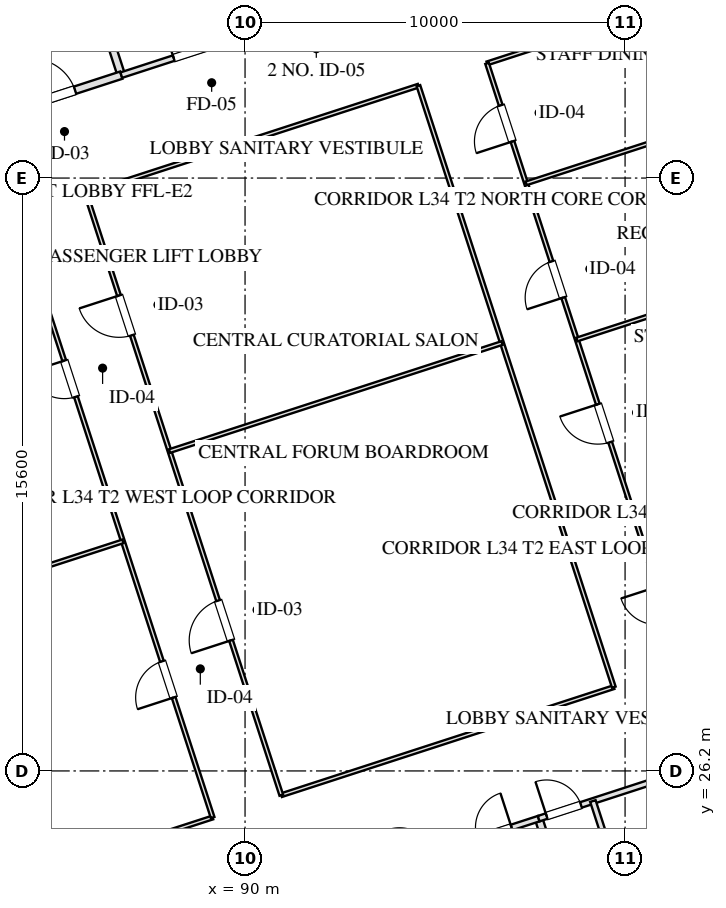
"""IFC4 building model, lengths in metres.
Left out: names, types, materials, properties, quantities, classifications, styles, units other than length and angle.
Written with IfcOpenShell. Run it as: python <this file> out.ifc"""

import sys

from ifc_helpers import new_model, si_unit, direction, frame, frame_2d, origin, place, context, subcontext, project, spatial, rectangle, extrude, element, fill, save


model = new_model("IFC4")
c1 = context("Model", 3, precision=1e-05, world=origin(), true_north=direction((0.0, 1.0)))
c2 = subcontext(c1, "Body", "Model", "MODEL_VIEW")
j1 = project(units=[si_unit("LENGTHUNIT", "METRE"), si_unit("PLANEANGLEUNIT", "RADIAN")], contexts=[c1])
p1 = place(None, origin())
s1 = spatial("IfcSite", under=j1, at=p1, CompositionType="ELEMENT")
p2 = place(p1, origin())
s2 = spatial("IfcBuilding", under=s1, at=p2, CompositionType="ELEMENT")
p3 = place(p2, frame((0.0, 0.0, 131.1)))
s3 = spatial("IfcBuildingStorey", under=s2, at=p3, CompositionType="ELEMENT", Elevation=131.1)
p4 = place(p3, frame((99.284, 61.41, 0.0), z_axis=(0.0, 0.0, 1.0), x_axis=(0.309017542002, -0.95105633836, 0.0)))
e1 = element("IfcWall", 1, at=p4, inside=s3, PredefinedType="SOLIDWALL", context=c2, shape_type="SweptSolid", body=[
    extrude(rectangle(XDim=46.4, YDim=0.4, at=frame_2d((23.2, 0.0))), origin(), (0.0, 0.0, 1.0), 2.61),
])
p5 = place(p4, frame((25.25, 0.0, 0.0)))
e2 = element("IfcOpeningElement", 2, at=p5, cuts=e1, PredefinedType="OPENING", context=c2, shape_type="SweptSolid", body=[
    extrude(rectangle(XDim=1.1, YDim=2.15, at=frame_2d((0.55, 1.075))), frame((0.0, 0.21, 0.0), z_axis=(0.0, -1.0, 0.0), x_axis=(1.0, 0.0, 0.0)), (0.0, 0.0, 1.0), 0.42),
])
p6 = place(p3, frame((97.727, 24.944, 0.0), z_axis=(0.0, 0.0, 1.0), x_axis=(0.309016001439, -0.951056838919, 0.0)))
e3 = element("IfcWall", 3, at=p6, inside=s3, PredefinedType="PARTITIONING", context=c2, shape_type="SweptSolid", body=[
    extrude(rectangle(XDim=8.43, YDim=0.2, at=frame_2d((4.215, 0.0))), origin(), (0.0, 0.0, 1.0), 3.175),
])
p7 = place(p3, frame((93.542, 23.585, 0.0), z_axis=(0.0, 0.0, 1.0), x_axis=(0.951063829732, 0.308994485023, 0.0)))
e4 = element("IfcWall", 4, at=p7, inside=s3, PredefinedType="PARTITIONING", context=c2, shape_type="SweptSolid", body=[
    extrude(rectangle(XDim=4.4, YDim=0.15, at=frame_2d((2.2, 0.0))), origin(), (0.0, 0.0, 1.0), 3.175),
])
p8 = place(p7, frame((0.55, 0.0, 0.0)))
e5 = element("IfcOpeningElement", 5, at=p8, cuts=e4, PredefinedType="OPENING", context=c2, shape_type="SweptSolid", body=[
    extrude(rectangle(XDim=0.95, YDim=2.05, at=frame_2d((0.475, 1.025))), frame((0.0, 0.085, 0.0), z_axis=(0.0, -1.0, 0.0), x_axis=(1.0, 0.0, 0.0)), (0.0, 0.0, 1.0), 0.17),
])
p9 = place(p7, frame((2.7, 0.0, 0.0)))
e6 = element("IfcOpeningElement", 6, at=p9, cuts=e4, PredefinedType="OPENING", context=c2, shape_type="SweptSolid", body=[
    extrude(rectangle(XDim=0.95, YDim=2.05, at=frame_2d((0.475, 1.025))), frame((0.0, 0.085, 0.0), z_axis=(0.0, -1.0, 0.0), x_axis=(1.0, 0.0, 0.0)), (0.0, 0.0, 1.0), 0.17),
])
p10 = place(p3, frame((97.727, 24.944, 0.0), z_axis=(0.0, 0.0, 1.0), x_axis=(0.951036872128, 0.309077446369, 0.0)))
e7 = element("IfcWall", 7, at=p10, inside=s3, PredefinedType="PARTITIONING", context=c2, shape_type="SweptSolid", body=[
    extrude(rectangle(XDim=3.2, YDim=0.15, at=frame_2d((1.6, 0.0))), origin(), (0.0, 0.0, 1.0), 3.175),
])
p11 = place(p10, frame((0.22, 0.0, 0.0)))
e8 = element("IfcOpeningElement", 8, at=p11, cuts=e7, PredefinedType="OPENING", context=c2, shape_type="SweptSolid", body=[
    extrude(rectangle(XDim=0.95, YDim=2.05, at=frame_2d((0.475, 1.025))), frame((0.0, 0.085, 0.0), z_axis=(0.0, -1.0, 0.0), x_axis=(1.0, 0.0, 0.0)), (0.0, 0.0, 1.0), 0.17),
])
p12 = place(p3, frame((99.153, 25.408, 0.0), z_axis=(0.0, 0.0, 1.0), x_axis=(0.309016001439, -0.951056838919, 0.0)))
e9 = element("IfcWall", 9, at=p12, inside=s3, PredefinedType="PARTITIONING", context=c2, shape_type="SweptSolid", body=[
    extrude(rectangle(XDim=8.43, YDim=0.15, at=frame_2d((4.215, 0.0))), origin(), (0.0, 0.0, 1.0), 3.175),
])
p13 = place(p12, frame((2.55, 0.0, 0.0)))
e10 = element("IfcOpeningElement", 10, at=p13, cuts=e9, PredefinedType="OPENING", context=c2, shape_type="SweptSolid", body=[
    extrude(rectangle(XDim=0.95, YDim=2.05, at=frame_2d((0.475, 1.025))), frame((0.0, 0.085, 0.0), z_axis=(0.0, -1.0, 0.0), x_axis=(1.0, 0.0, 0.0)), (0.0, 0.0, 1.0), 0.17),
])
p14 = place(p12, frame((5.8, 0.0, 0.0)))
e11 = element("IfcOpeningElement", 11, at=p14, cuts=e9, PredefinedType="OPENING", context=c2, shape_type="SweptSolid", body=[
    extrude(rectangle(XDim=0.9, YDim=2.05, at=frame_2d((0.45, 1.025))), frame((0.0, 0.085, 0.0), z_axis=(0.0, -1.0, 0.0), x_axis=(1.0, 0.0, 0.0)), (0.0, 0.0, 1.0), 0.17),
])
p15 = place(p3, frame((86.743, 44.508, 0.0), z_axis=(0.0, 0.0, 1.0), x_axis=(-0.309016001439, 0.951056838919, 0.0)))
e12 = element("IfcWall", 12, at=p15, inside=s3, PredefinedType="PARTITIONING", context=c2, shape_type="SweptSolid", body=[
    extrude(rectangle(XDim=8.43, YDim=0.2, at=frame_2d((4.215, 0.0))), origin(), (0.0, 0.0, 1.0), 3.175),
])
p16 = place(p3, frame((83.101, 43.324, 0.0), z_axis=(0.0, 0.0, 1.0), x_axis=(0.951052804469, 0.309028417967, 0.0)))
e13 = element("IfcWall", 13, at=p16, inside=s3, PredefinedType="PARTITIONING", context=c2, shape_type="SweptSolid", body=[
    extrude(rectangle(XDim=3.83, YDim=0.2, at=frame_2d((1.915, 0.0))), origin(), (0.0, 0.0, 1.0), 3.175),
])
p17 = place(p16, frame((1.35, 0.0, 0.0)))
e14 = element("IfcOpeningElement", 14, at=p17, cuts=e13, PredefinedType="OPENING", context=c2, shape_type="SweptSolid", body=[
    extrude(rectangle(XDim=1.2, YDim=2.05, at=frame_2d((0.6, 1.025))), frame((0.0, 0.11, 0.0), z_axis=(0.0, -1.0, 0.0), x_axis=(1.0, 0.0, 0.0)), (0.0, 0.0, 1.0), 0.22),
])
p18 = place(p3, frame((86.743, 44.508, 0.0), z_axis=(0.0, 0.0, 1.0), x_axis=(0.951063829732, 0.308994485023, 0.0)))
e15 = element("IfcWall", 15, at=p18, inside=s3, PredefinedType="PARTITIONING", context=c2, shape_type="SweptSolid", body=[
    extrude(rectangle(XDim=4.4, YDim=0.15, at=frame_2d((2.2, 0.0))), origin(), (0.0, 0.0, 1.0), 3.175),
])
p19 = place(p18, frame((1.45, 0.0, 0.0)))
e16 = element("IfcOpeningElement", 16, at=p19, cuts=e15, PredefinedType="OPENING", context=c2, shape_type="SweptSolid", body=[
    extrude(rectangle(XDim=1.5, YDim=2.05, at=frame_2d((0.75, 1.025))), frame((0.0, 0.085, 0.0), z_axis=(0.0, -1.0, 0.0), x_axis=(1.0, 0.0, 0.0)), (0.0, 0.0, 1.0), 0.17),
])
p20 = place(p3, frame((76.308, 20.803, 0.0), z_axis=(0.0, 0.0, 1.0), x_axis=(0.951054001411, 0.309024734286, 0.0)))
e17 = element("IfcWall", 17, at=p20, inside=s3, PredefinedType="MOVABLE", context=c2, shape_type="SweptSolid", body=[
    extrude(rectangle(XDim=13.5, YDim=0.1, at=frame_2d((6.75, 0.0))), origin(), (0.0, 0.0, 1.0), 3.175),
])
p21 = place(p3, frame((90.954, 25.562, 0.0), z_axis=(0.0, 0.0, 1.0), x_axis=(0.951052398814, 0.309029666393, 0.0)))
e18 = element("IfcWall", 18, at=p21, inside=s3, PredefinedType="MOVABLE", context=c2, shape_type="SweptSolid", body=[
    extrude(rectangle(XDim=9.2, YDim=0.1, at=frame_2d((4.6, 0.0))), origin(), (0.0, 0.0, 1.0), 3.175),
])
p22 = place(p3, frame((85.812, 41.387, 0.0), z_axis=(0.0, 0.0, 1.0), x_axis=(0.951054933035, 0.309021867106, 0.0)))
e19 = element("IfcWall", 19, at=p22, inside=s3, PredefinedType="MOVABLE", context=c2, shape_type="SweptSolid", body=[
    extrude(rectangle(XDim=9.2, YDim=0.1, at=frame_2d((4.6, 0.0))), origin(), (0.0, 0.0, 1.0), 3.175),
])
p23 = place(p3, frame((96.369, 44.818, 0.0), z_axis=(0.0, 0.0, 1.0), x_axis=(0.9510592298, 0.30900864294, 0.0)))
e20 = element("IfcWall", 20, at=p23, inside=s3, PredefinedType="MOVABLE", context=c2, shape_type="SweptSolid", body=[
    extrude(rectangle(XDim=7.7, YDim=0.1, at=frame_2d((3.85, 0.0))), origin(), (0.0, 0.0, 1.0), 3.175),
])
p24 = place(p3, frame((89.147, 24.975, 0.0), z_axis=(0.0, 0.0, 1.0), x_axis=(-0.309022042254, 0.951054876125, 0.0)))
e21 = element("IfcWall", 21, at=p24, inside=s3, PredefinedType="MOVABLE", context=c2, shape_type="SweptSolid", body=[
    extrude(rectangle(XDim=16.64, YDim=0.1, at=frame_2d((8.32, 0.0))), origin(), (0.0, 0.0, 1.0), 3.175),
])
p25 = place(p24, frame((3.32, 0.0, 0.0)))
e22 = element("IfcOpeningElement", 22, at=p25, cuts=e21, PredefinedType="OPENING", context=c2, shape_type="SweptSolid", body=[
    extrude(rectangle(XDim=1.0, YDim=2.05, at=frame_2d((0.5, 1.025))), frame((0.0, 0.06, 0.0), z_axis=(0.0, -1.0, 0.0), x_axis=(1.0, 0.0, 0.0)), (0.0, 0.0, 1.0), 0.12),
])
p26 = place(p24, frame((11.64, 0.0, 0.0)))
e23 = element("IfcOpeningElement", 23, at=p26, cuts=e21, PredefinedType="OPENING", context=c2, shape_type="SweptSolid", body=[
    extrude(rectangle(XDim=1.0, YDim=2.05, at=frame_2d((0.5, 1.025))), frame((0.0, 0.06, 0.0), z_axis=(0.0, -1.0, 0.0), x_axis=(1.0, 0.0, 0.0)), (0.0, 0.0, 1.0), 0.12),
])
p27 = place(p3, frame((90.954, 25.562, 0.0), z_axis=(0.0, 0.0, 1.0), x_axis=(-0.30901773025, 0.951056277195, 0.0)))
e24 = element("IfcWall", 24, at=p27, inside=s3, PredefinedType="MOVABLE", context=c2, shape_type="SweptSolid", body=[
    extrude(rectangle(XDim=16.64, YDim=0.1, at=frame_2d((8.32, 0.0))), origin(), (0.0, 0.0, 1.0), 3.175),
])
p28 = place(p27, frame((4.284, 0.0, 0.0)))
e25 = element("IfcOpeningElement", 25, at=p28, cuts=e24, PredefinedType="OPENING", context=c2, shape_type="SweptSolid", body=[
    extrude(rectangle(XDim=1.1, YDim=2.05, at=frame_2d((0.55, 1.025))), frame((0.0, 0.06, 0.0), z_axis=(0.0, -1.0, 0.0), x_axis=(1.0, 0.0, 0.0)), (0.0, 0.0, 1.0), 0.12),
])
p29 = place(p27, frame((12.724, 0.0, 0.0)))
e26 = element("IfcOpeningElement", 26, at=p29, cuts=e24, PredefinedType="OPENING", context=c2, shape_type="SweptSolid", body=[
    extrude(rectangle(XDim=1.1, YDim=2.05, at=frame_2d((0.55, 1.025))), frame((0.0, 0.06, 0.0), z_axis=(0.0, -1.0, 0.0), x_axis=(1.0, 0.0, 0.0)), (0.0, 0.0, 1.0), 0.12),
])
p30 = place(p3, frame((99.704, 28.405, 0.0), z_axis=(0.0, 0.0, 1.0), x_axis=(-0.309004459387, 0.951060589068, 0.0)))
e27 = element("IfcWall", 27, at=p30, inside=s3, PredefinedType="MOVABLE", context=c2, shape_type="SweptSolid", body=[
    extrude(rectangle(XDim=16.64, YDim=0.1, at=frame_2d((8.32, 0.0))), origin(), (0.0, 0.0, 1.0), 3.175),
])
p31 = place(p3, frame((101.511, 28.992, 0.0), z_axis=(0.0, 0.0, 1.0), x_axis=(-0.30901773025, 0.951056277195, 0.0)))
e28 = element("IfcWall", 28, at=p31, inside=s3, PredefinedType="MOVABLE", context=c2, shape_type="SweptSolid", body=[
    extrude(rectangle(XDim=16.64, YDim=0.1, at=frame_2d((8.32, 0.0))), origin(), (0.0, 0.0, 1.0), 3.175),
])
p32 = place(p31, frame((1.16, 0.0, 0.0)))
e29 = element("IfcOpeningElement", 29, at=p32, cuts=e28, PredefinedType="OPENING", context=c2, shape_type="SweptSolid", body=[
    extrude(rectangle(XDim=1.0, YDim=2.05, at=frame_2d((0.5, 1.025))), frame((0.0, 0.06, 0.0), z_axis=(0.0, -1.0, 0.0), x_axis=(1.0, 0.0, 0.0)), (0.0, 0.0, 1.0), 0.12),
])
p33 = place(p31, frame((6.16, 0.0, 0.0)))
e30 = element("IfcOpeningElement", 30, at=p33, cuts=e28, PredefinedType="OPENING", context=c2, shape_type="SweptSolid", body=[
    extrude(rectangle(XDim=1.05, YDim=2.05, at=frame_2d((0.525, 1.025))), frame((0.0, 0.06, 0.0), z_axis=(0.0, -1.0, 0.0), x_axis=(1.0, 0.0, 0.0)), (0.0, 0.0, 1.0), 0.12),
])
p34 = place(p31, frame((10.16, 0.0, 0.0)))
e31 = element("IfcOpeningElement", 31, at=p34, cuts=e28, PredefinedType="OPENING", context=c2, shape_type="SweptSolid", body=[
    extrude(rectangle(XDim=1.0, YDim=2.05, at=frame_2d((0.5, 1.025))), frame((0.0, 0.06, 0.0), z_axis=(0.0, -1.0, 0.0), x_axis=(1.0, 0.0, 0.0)), (0.0, 0.0, 1.0), 0.12),
])
p35 = place(p31, frame((14.48, 0.0, 0.0)))
e32 = element("IfcOpeningElement", 32, at=p35, cuts=e28, PredefinedType="OPENING", context=c2, shape_type="SweptSolid", body=[
    extrude(rectangle(XDim=1.0, YDim=2.05, at=frame_2d((0.5, 1.025))), frame((0.0, 0.06, 0.0), z_axis=(0.0, -1.0, 0.0), x_axis=(1.0, 0.0, 0.0)), (0.0, 0.0, 1.0), 0.12),
])
p36 = place(p3, frame((88.012, 34.616, 0.0), z_axis=(0.0, 0.0, 1.0), x_axis=(0.951054933035, 0.309021867106, 0.0)))
e33 = element("IfcWall", 33, at=p36, inside=s3, PredefinedType="MOVABLE", context=c2, shape_type="SweptSolid", body=[
    extrude(rectangle(XDim=9.2, YDim=0.1, at=frame_2d((4.6, 0.0))), origin(), (0.0, 0.0, 1.0), 3.175),
])
p37 = place(p3, frame((73.947, 28.069, 0.0), z_axis=(0.0, 0.0, 1.0), x_axis=(0.951059316265, 0.309008376821, 0.0)))
e34 = element("IfcWall", 34, at=p37, inside=s3, PredefinedType="MOVABLE", context=c2, shape_type="SweptSolid", body=[
    extrude(rectangle(XDim=13.5, YDim=0.1, at=frame_2d((6.75, 0.0))), origin(), (0.0, 0.0, 1.0), 3.175),
])
p38 = place(p3, frame((100.176, 33.101, 0.0), z_axis=(0.0, 0.0, 1.0), x_axis=(0.951056202154, 0.3090179612, 0.0)))
e35 = element("IfcWall", 35, at=p38, inside=s3, PredefinedType="MOVABLE", context=c2, shape_type="SweptSolid", body=[
    extrude(rectangle(XDim=7.7, YDim=0.1, at=frame_2d((3.85, 0.0))), origin(), (0.0, 0.0, 1.0), 3.175),
])
for number, where, z_axis, x_axis in (
    (36, (98.73, 37.552, 0.0), (0.0, 0.0, 1.0), (0.951, 0.309, 0.0)),
    (37, (97.395, 41.66, 0.0), (0.0, 0.0, 1.0), (0.951, 0.309, 0.0)),
):
    element("IfcWall", number, at=place(p3, frame(where, z_axis=z_axis, x_axis=x_axis)), inside=s3, PredefinedType="MOVABLE", context=c2, shape_type="SweptSolid", body=[
        extrude(rectangle(XDim=7.7, YDim=0.1, at=frame_2d((3.85, 0.0))), origin(), (0.0, 0.0, 1.0), 3.175),
    ])
p39 = place(p9, origin())
e38 = element("IfcDoor", 38, at=p39, inside=s3, OperationType="SINGLE_SWING_RIGHT", PredefinedType="DOOR", context=c2, shape_type="SweptSolid", body=[
    extrude(rectangle(XDim=0.95, YDim=2.05, at=frame_2d((0.475, 1.025))), frame((0.0, 0.025, 0.0), z_axis=(0.0, -1.0, 0.0), x_axis=(1.0, 0.0, 0.0)), (0.0, 0.0, 1.0), 0.05),
])
fill(e6, e38)
p40 = place(p11, origin())
e39 = element("IfcDoor", 39, at=p40, inside=s3, OperationType="SINGLE_SWING_LEFT", PredefinedType="DOOR", context=c2, shape_type="SweptSolid", body=[
    extrude(rectangle(XDim=0.95, YDim=2.05, at=frame_2d((0.475, 1.025))), frame((0.0, 0.025, 0.0), z_axis=(0.0, -1.0, 0.0), x_axis=(1.0, 0.0, 0.0)), (0.0, 0.0, 1.0), 0.05),
])
fill(e8, e39)
p41 = place(p17, origin())
e40 = element("IfcDoor", 40, at=p41, inside=s3, OperationType="SINGLE_SWING_LEFT", PredefinedType="DOOR", context=c2, shape_type="SweptSolid", body=[
    extrude(rectangle(XDim=1.2, YDim=2.05, at=frame_2d((0.6, 1.025))), frame((0.0, 0.025, 0.0), z_axis=(0.0, -1.0, 0.0), x_axis=(1.0, 0.0, 0.0)), (0.0, 0.0, 1.0), 0.05),
])
fill(e14, e40)
p42 = place(p19, origin())
e41 = element("IfcDoor", 41, at=p42, inside=s3, OperationType="SINGLE_SWING_LEFT", PredefinedType="DOOR", context=c2, shape_type="SweptSolid", body=[
    extrude(rectangle(XDim=1.5, YDim=2.05, at=frame_2d((0.75, 1.025))), frame((0.0, 0.025, 0.0), z_axis=(0.0, -1.0, 0.0), x_axis=(1.0, 0.0, 0.0)), (0.0, 0.0, 1.0), 0.05),
])
fill(e16, e41)
p43 = place(p25, origin())
e42 = element("IfcDoor", 42, at=p43, inside=s3, OperationType="SINGLE_SWING_LEFT", PredefinedType="DOOR", context=c2, shape_type="SweptSolid", body=[
    extrude(rectangle(XDim=1.0, YDim=2.05, at=frame_2d((0.5, 1.025))), frame((0.0, 0.025, 0.0), z_axis=(0.0, -1.0, 0.0), x_axis=(1.0, 0.0, 0.0)), (0.0, 0.0, 1.0), 0.05),
])
fill(e22, e42)
p44 = place(p26, origin())
e43 = element("IfcDoor", 43, at=p44, inside=s3, OperationType="SINGLE_SWING_RIGHT", PredefinedType="DOOR", context=c2, shape_type="SweptSolid", body=[
    extrude(rectangle(XDim=1.0, YDim=2.05, at=frame_2d((0.5, 1.025))), frame((0.0, 0.025, 0.0), z_axis=(0.0, -1.0, 0.0), x_axis=(1.0, 0.0, 0.0)), (0.0, 0.0, 1.0), 0.05),
])
fill(e23, e43)
p45 = place(p28, origin())
e44 = element("IfcDoor", 44, at=p45, inside=s3, OperationType="SINGLE_SWING_LEFT", PredefinedType="DOOR", context=c2, shape_type="SweptSolid", body=[
    extrude(rectangle(XDim=1.1, YDim=2.05, at=frame_2d((0.55, 1.025))), frame((0.0, 0.025, 0.0), z_axis=(0.0, -1.0, 0.0), x_axis=(1.0, 0.0, 0.0)), (0.0, 0.0, 1.0), 0.05),
])
fill(e25, e44)
p46 = place(p29, origin())
e45 = element("IfcDoor", 45, at=p46, inside=s3, OperationType="SINGLE_SWING_RIGHT", PredefinedType="DOOR", context=c2, shape_type="SweptSolid", body=[
    extrude(rectangle(XDim=1.1, YDim=2.05, at=frame_2d((0.55, 1.025))), frame((0.0, 0.025, 0.0), z_axis=(0.0, -1.0, 0.0), x_axis=(1.0, 0.0, 0.0)), (0.0, 0.0, 1.0), 0.05),
])
fill(e26, e45)
p47 = place(p33, origin())
e46 = element("IfcDoor", 46, at=p47, inside=s3, OperationType="SINGLE_SWING_RIGHT", PredefinedType="DOOR", context=c2, shape_type="SweptSolid", body=[
    extrude(rectangle(XDim=1.05, YDim=2.05, at=frame_2d((0.525, 1.025))), frame((0.0, 0.025, 0.0), z_axis=(0.0, -1.0, 0.0), x_axis=(1.0, 0.0, 0.0)), (0.0, 0.0, 1.0), 0.05),
])
fill(e30, e46)
p48 = place(p34, origin())
e47 = element("IfcDoor", 47, at=p48, inside=s3, OperationType="SINGLE_SWING_LEFT", PredefinedType="DOOR", context=c2, shape_type="SweptSolid", body=[
    extrude(rectangle(XDim=1.0, YDim=2.05, at=frame_2d((0.5, 1.025))), frame((0.0, 0.025, 0.0), z_axis=(0.0, -1.0, 0.0), x_axis=(1.0, 0.0, 0.0)), (0.0, 0.0, 1.0), 0.05),
])
fill(e31, e47)
p49 = place(p35, origin())
e48 = element("IfcDoor", 48, at=p49, inside=s3, OperationType="SINGLE_SWING_LEFT", PredefinedType="DOOR", context=c2, shape_type="SweptSolid", body=[
    extrude(rectangle(XDim=1.0, YDim=2.05, at=frame_2d((0.5, 1.025))), frame((0.0, 0.025, 0.0), z_axis=(0.0, -1.0, 0.0), x_axis=(1.0, 0.0, 0.0)), (0.0, 0.0, 1.0), 0.05),
])
fill(e32, e48)
save(model, sys.argv[1])
